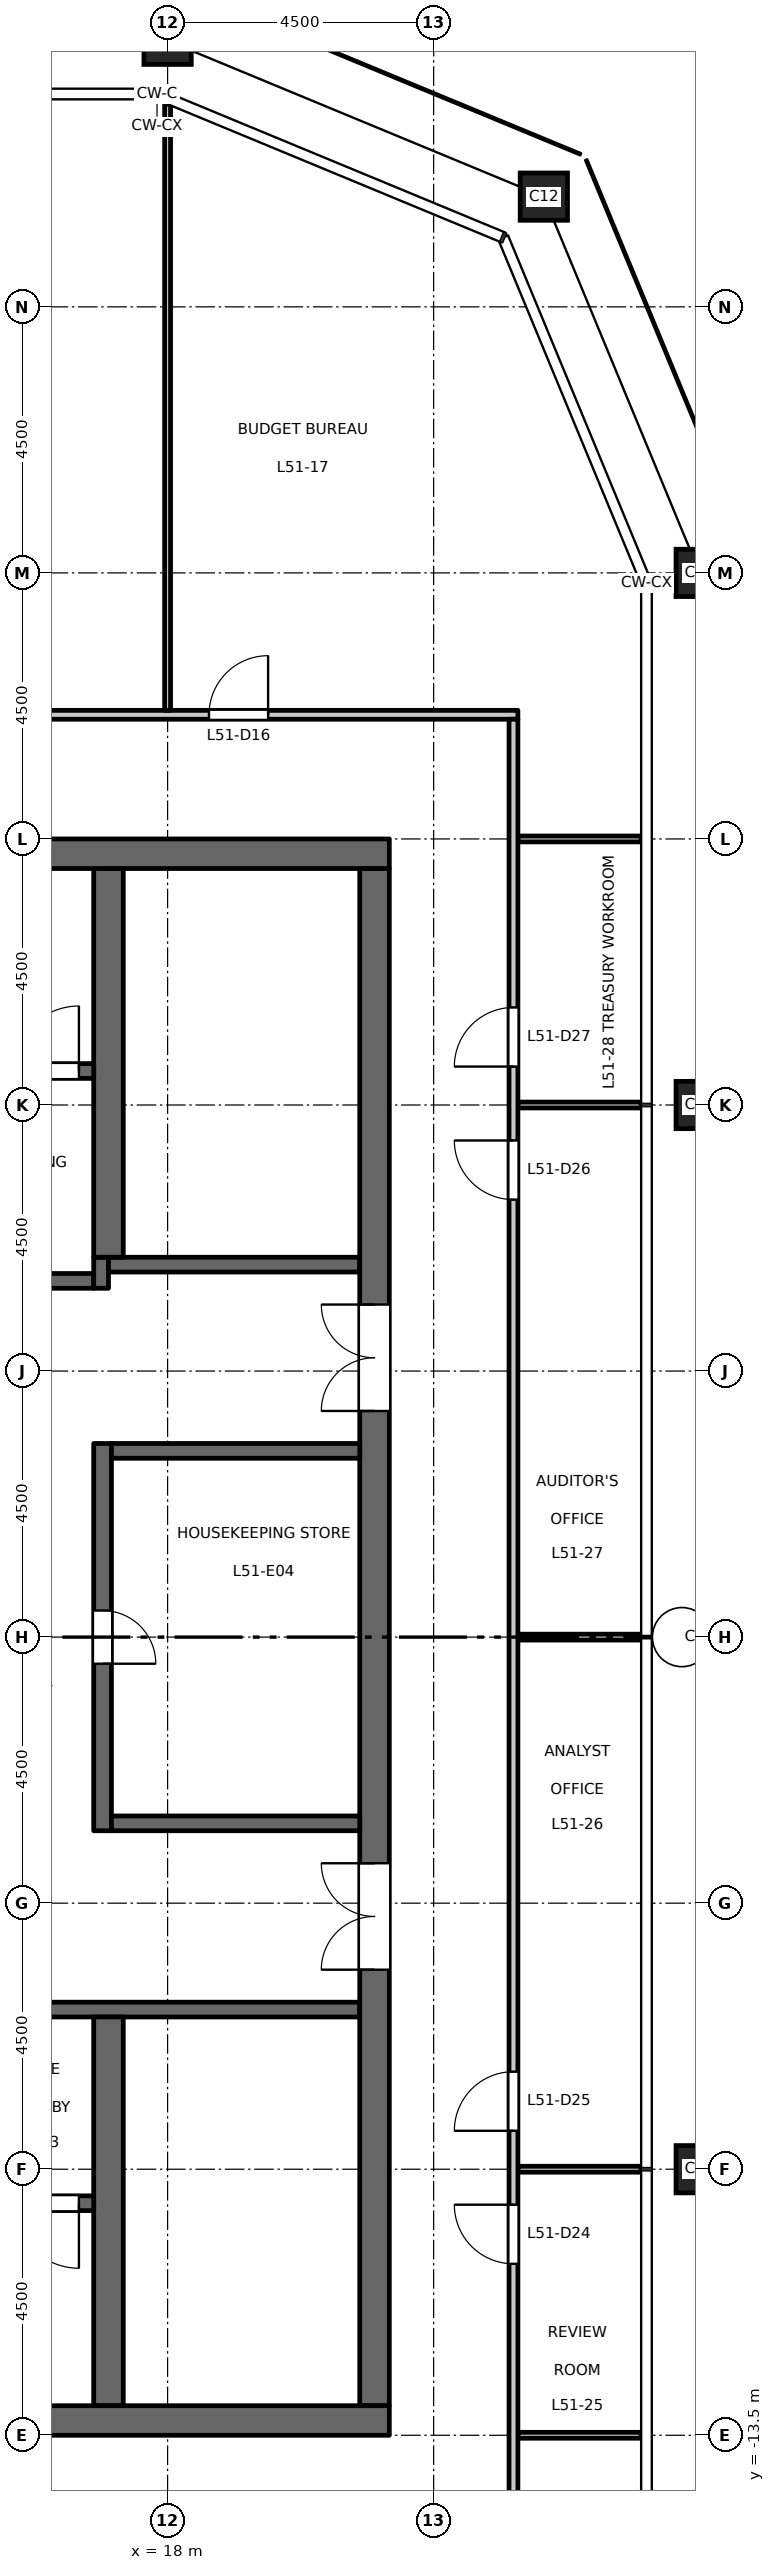
"""IFC4 building model, lengths in metres.
Left out: names, types, materials, properties, quantities, classifications, styles, units other than length and angle.
Written with IfcOpenShell. Run it as: python <this file> out.ifc"""

import sys

from ifc_helpers import new_model, si_unit, direction, frame, frame_2d, origin, origin_2d, place, context, subcontext, project, spatial, rectangle, hollow_rectangle, extrude, element, fill, save


model = new_model("IFC4")
c1 = context("Model", 3, precision=1e-05, world=origin(), true_north=direction((0.0, 1.0)))
c2 = subcontext(c1, "Body", "Model", "MODEL_VIEW")
j1 = project(units=[si_unit("LENGTHUNIT", "METRE"), si_unit("PLANEANGLEUNIT", "RADIAN")], contexts=[c1])
p1 = place(None, origin())
s1 = spatial("IfcSite", under=j1, at=p1, CompositionType="ELEMENT")
p2 = place(p1, origin())
s2 = spatial("IfcBuilding", under=s1, at=p2, CompositionType="ELEMENT")
p3 = place(p2, frame((0.0, 0.0, 237.7)))
s3 = spatial("IfcBuildingStorey", under=s2, at=p3, CompositionType="ELEMENT", Elevation=237.7)
for number, where, z_axis, x_axis in (
    (1, (27.0, -9.0, 0.0), (0.0, 0.0, 1.0), (1.0, 0.0, 0.0)),
    (2, (27.0, 0.0, 0.0), (0.0, 0.0, 1.0), (1.0, 0.0, 0.0)),
    (3, (27.0, 9.0, 0.0), (0.0, 0.0, 1.0), (1.0, 0.0, 0.0)),
    (4, (27.0, 18.0, 0.0), (0.0, 0.0, 1.0), (1.0, 0.0, 0.0)),
    (5, (24.364, 24.364, 0.0), (0.0, 0.0, 1.0), (1.0, 0.0, 0.0)),
    (6, (18.0, 27.0, 0.0), (0.0, 0.0, 1.0), (1.0, 0.0, 0.0)),
):
    element("IfcColumn", number, at=place(p3, frame(where, z_axis=z_axis, x_axis=x_axis)), inside=s3, PredefinedType="COLUMN", context=c2, shape_type="SweptSolid", body=[
        extrude(hollow_rectangle(XDim=0.8, YDim=0.8, WallThickness=0.045, at=origin_2d()), origin(), (0.0, 0.0, 1.0), 4.5),
    ])
p4 = place(p3, frame((12.15, 6.025, 0.0), z_axis=(0.0, 0.0, 1.0), x_axis=(1.0, 0.0, 0.0)))
e7 = element("IfcWall", 7, at=p4, inside=s3, PredefinedType="SHEAR", context=c2, shape_type="SweptSolid", body=[
    extrude(rectangle(XDim=4.6, YDim=0.25, at=frame_2d((2.3, 0.0))), origin(), (0.0, 0.0, 1.0), 4.35),
])
p5 = place(p4, frame((1.8, 0.0, 0.0)))
e8 = element("IfcOpeningElement", 8, at=p5, cuts=e7, PredefinedType="OPENING", context=c2, shape_type="SweptSolid", body=[
    extrude(rectangle(XDim=1.0, YDim=2.1, at=frame_2d((0.5, 1.05))), frame((0.0, 0.135, 0.0), z_axis=(0.0, -1.0, 0.0), x_axis=(1.0, 0.0, 0.0)), (0.0, 0.0, 1.0), 0.27),
])
p6 = place(p3, frame((16.875, 5.9, 0.0), z_axis=(0.0, 0.0, 1.0), x_axis=(0.0, 1.0, 0.0)))
e9 = element("IfcWall", 9, at=p6, inside=s3, PredefinedType="SHEAR", context=c2, shape_type="SweptSolid", body=[
    extrude(rectangle(XDim=0.525, YDim=0.25, at=frame_2d((0.263, 0.0))), origin(), (0.0, 0.0, 1.0), 4.35),
])
p7 = place(p3, frame((17.0, 6.3, 0.0), z_axis=(0.0, 0.0, 1.0), x_axis=(1.0, 0.0, 0.0)))
e10 = element("IfcWall", 10, at=p7, inside=s3, PredefinedType="SHEAR", context=c2, shape_type="SweptSolid", body=[
    extrude(rectangle(XDim=4.25, YDim=0.25, at=frame_2d((2.125, 0.0))), origin(), (0.0, 0.0, 1.0), 4.35),
])
p8 = place(p3, frame((12.15, -6.3, 0.0), z_axis=(0.0, 0.0, 1.0), x_axis=(1.0, 0.0, 0.0)))
e11 = element("IfcWall", 11, at=p8, inside=s3, PredefinedType="SHEAR", context=c2, shape_type="SweptSolid", body=[
    extrude(rectangle(XDim=9.1, YDim=0.25, at=frame_2d((4.55, 0.0))), origin(), (0.0, 0.0, 1.0), 4.35),
])
p9 = place(p8, frame((1.8, 0.0, 0.0)))
e12 = element("IfcOpeningElement", 12, at=p9, cuts=e11, PredefinedType="OPENING", context=c2, shape_type="SweptSolid", body=[
    extrude(rectangle(XDim=1.0, YDim=2.1, at=frame_2d((0.5, 1.05))), frame((0.0, 0.135, 0.0), z_axis=(0.0, -1.0, 0.0), x_axis=(1.0, 0.0, 0.0)), (0.0, 0.0, 1.0), 0.27),
])
p10 = place(p3, frame((21.5, -13.0, 0.0), z_axis=(0.0, 0.0, 1.0), x_axis=(0.0, 1.0, 0.0)))
e13 = element("IfcWall", 13, at=p10, inside=s3, PredefinedType="SHEAR", context=c2, shape_type="SweptSolid", body=[
    extrude(rectangle(XDim=26.0, YDim=0.5, at=frame_2d((13.0, 0.0))), origin(), (0.0, 0.0, 1.0), 4.35),
])
p11 = place(p10, frame((16.825, 0.0, 0.0)))
e14 = element("IfcOpeningElement", 14, at=p11, cuts=e13, PredefinedType="OPENING", context=c2, shape_type="SweptSolid", body=[
    extrude(rectangle(XDim=1.8, YDim=2.1, at=frame_2d((0.9, 1.05))), frame((0.0, 0.26, 0.0), z_axis=(0.0, -1.0, 0.0), x_axis=(1.0, 0.0, 0.0)), (0.0, 0.0, 1.0), 0.52),
])
p12 = place(p10, frame((7.375, 0.0, 0.0)))
e15 = element("IfcOpeningElement", 15, at=p12, cuts=e13, PredefinedType="OPENING", context=c2, shape_type="SweptSolid", body=[
    extrude(rectangle(XDim=1.8, YDim=2.1, at=frame_2d((0.9, 1.05))), frame((0.0, 0.26, 0.0), z_axis=(0.0, -1.0, 0.0), x_axis=(1.0, 0.0, 0.0)), (0.0, 0.0, 1.0), 0.52),
])
p13 = place(p3, frame((16.9, -3.275, 0.0), z_axis=(0.0, 0.0, 1.0), x_axis=(0.0, 1.0, 0.0)))
e16 = element("IfcWall", 16, at=p13, inside=s3, PredefinedType="SHEAR", context=c2, shape_type="SweptSolid", body=[
    extrude(rectangle(XDim=6.55, YDim=0.3, at=frame_2d((3.275, 0.0))), origin(), (0.0, 0.0, 1.0), 4.35),
])
p14 = place(p13, frame((2.825, 0.0, 0.0)))
e17 = element("IfcOpeningElement", 17, at=p14, cuts=e16, PredefinedType="OPENING", context=c2, shape_type="SweptSolid", body=[
    extrude(rectangle(XDim=0.9, YDim=2.1, at=frame_2d((0.45, 1.05))), frame((0.0, 0.16, 0.0), z_axis=(0.0, -1.0, 0.0), x_axis=(1.0, 0.0, 0.0)), (0.0, 0.0, 1.0), 0.32),
])
for number, where, z_axis, x_axis in (
    (18, (17.05, 3.15, 0.0), (0.0, 0.0, 1.0), (1.0, 0.0, 0.0)),
    (19, (17.05, -3.15, 0.0), (0.0, 0.0, 1.0), (1.0, 0.0, 0.0)),
):
    element("IfcWall", number, at=place(p3, frame(where, z_axis=z_axis, x_axis=x_axis)), inside=s3, PredefinedType="SHEAR", context=c2, shape_type="SweptSolid", body=[
        extrude(rectangle(XDim=4.2, YDim=0.25, at=frame_2d((2.1, 0.0))), origin(), (0.0, 0.0, 1.0), 4.35),
    ])
for number, where, z_axis, x_axis in (
    (20, (17.0, 6.425, 0.0), (0.0, 0.0, 1.0), (0.0, 1.0, 0.0)),
    (21, (17.0, -13.0, 0.0), (0.0, 0.0, 1.0), (0.0, 1.0, 0.0)),
):
    element("IfcWall", number, at=place(p3, frame(where, z_axis=z_axis, x_axis=x_axis)), inside=s3, PredefinedType="SHEAR", context=c2, shape_type="SweptSolid", body=[
        extrude(rectangle(XDim=6.575, YDim=0.5, at=frame_2d((3.288, 0.0))), origin(), (0.0, 0.0, 1.0), 4.35),
    ])
p15 = place(p3, frame((8.75, 9.575, 0.0), z_axis=(0.0, 0.0, 1.0), x_axis=(1.0, 0.0, 0.0)))
e22 = element("IfcWall", 22, at=p15, inside=s3, PredefinedType="SHEAR", context=c2, shape_type="SweptSolid", body=[
    extrude(rectangle(XDim=8.0, YDim=0.25, at=frame_2d((4.0, 0.0))), origin(), (0.0, 0.0, 1.0), 4.35),
])
p16 = place(p15, frame((6.65, 0.0, 0.0)))
e23 = element("IfcOpeningElement", 23, at=p16, cuts=e22, PredefinedType="OPENING", context=c2, shape_type="SweptSolid", body=[
    extrude(rectangle(XDim=1.1, YDim=2.1, at=frame_2d((0.55, 1.05))), frame((0.0, 0.135, 0.0), z_axis=(0.0, -1.0, 0.0), x_axis=(1.0, 0.0, 0.0)), (0.0, 0.0, 1.0), 0.27),
])
p17 = place(p3, frame((8.75, -9.575, 0.0), z_axis=(0.0, 0.0, 1.0), x_axis=(1.0, 0.0, 0.0)))
e24 = element("IfcWall", 24, at=p17, inside=s3, PredefinedType="SHEAR", context=c2, shape_type="SweptSolid", body=[
    extrude(rectangle(XDim=8.0, YDim=0.25, at=frame_2d((4.0, 0.0))), origin(), (0.0, 0.0, 1.0), 4.35),
])
p18 = place(p17, frame((6.65, 0.0, 0.0)))
e25 = element("IfcOpeningElement", 25, at=p18, cuts=e24, PredefinedType="OPENING", context=c2, shape_type="SweptSolid", body=[
    extrude(rectangle(XDim=1.1, YDim=2.1, at=frame_2d((0.55, 1.05))), frame((0.0, 0.135, 0.0), z_axis=(0.0, -1.0, 0.0), x_axis=(1.0, 0.0, 0.0)), (0.0, 0.0, 1.0), 0.27),
])
for number, where, z_axis, x_axis in (
    (26, (8.25, 13.25, 0.0), (0.0, 0.0, 1.0), (1.0, 0.0, 0.0)),
    (27, (8.25, -13.25, 0.0), (0.0, 0.0, 1.0), (1.0, 0.0, 0.0)),
):
    element("IfcWall", number, at=place(p3, frame(where, z_axis=z_axis, x_axis=x_axis)), inside=s3, PredefinedType="SHEAR", context=c2, shape_type="SweptSolid", body=[
        extrude(rectangle(XDim=13.5, YDim=0.5, at=frame_2d((6.75, 0.0))), origin(), (0.0, 0.0, 1.0), 4.35),
    ])
p19 = place(p3, frame((23.925, -13.5, 0.0), z_axis=(0.0, 0.0, 1.0), x_axis=(1.0, 0.0, 0.0)))
e28 = element("IfcWall", 28, at=p19, inside=s3, PredefinedType="PARTITIONING", context=c2, shape_type="SweptSolid", body=[
    extrude(rectangle(XDim=2.085, YDim=0.1, at=frame_2d((1.042, 0.0))), origin(), (0.0, 0.0, 1.0), 3.95),
])
for number, where, z_axis, x_axis in (
    (29, (23.925, -9.0, 0.0), (0.0, 0.0, 1.0), (1.0, 0.0, 0.0)),
    (30, (23.925, 0.0, 0.0), (0.0, 0.0, 1.0), (1.0, 0.0, 0.0)),
    (31, (23.925, 9.0, 0.0), (0.0, 0.0, 1.0), (1.0, 0.0, 0.0)),
    (32, (23.925, 13.5, 0.0), (0.0, 0.0, 1.0), (1.0, 0.0, 0.0)),
):
    element("IfcWall", number, at=place(p3, frame(where, z_axis=z_axis, x_axis=x_axis)), inside=s3, PredefinedType="PARTITIONING", context=c2, shape_type="SweptSolid", body=[
        extrude(rectangle(XDim=2.085, YDim=0.1, at=frame_2d((1.042, 0.0))), origin(), (0.0, 0.0, 1.0), 4.35),
    ])
p20 = place(p3, frame((-23.925, 15.6, 0.0), z_axis=(0.0, 0.0, 1.0), x_axis=(1.0, 0.0, 0.0)))
e33 = element("IfcWall", 33, at=p20, inside=s3, PredefinedType="PARTITIONING", context=c2, shape_type="SweptSolid", body=[
    extrude(rectangle(XDim=47.85, YDim=0.15, at=frame_2d((23.925, 0.0))), origin(), (0.0, 0.0, 1.0), 4.35),
])
p21 = place(p20, frame((13.275, 0.0, 0.0)))
e34 = element("IfcOpeningElement", 34, at=p21, cuts=e33, PredefinedType="OPENING", context=c2, shape_type="SweptSolid", body=[
    extrude(rectangle(XDim=1.0, YDim=2.1, at=frame_2d((0.5, 1.05))), frame((0.0, 0.085, 0.0), z_axis=(0.0, -1.0, 0.0), x_axis=(1.0, 0.0, 0.0)), (0.0, 0.0, 1.0), 0.17),
])
p22 = place(p20, frame((15.525, 0.0, 0.0)))
e35 = element("IfcOpeningElement", 35, at=p22, cuts=e33, PredefinedType="OPENING", context=c2, shape_type="SweptSolid", body=[
    extrude(rectangle(XDim=1.0, YDim=2.1, at=frame_2d((0.5, 1.05))), frame((0.0, 0.085, 0.0), z_axis=(0.0, -1.0, 0.0), x_axis=(1.0, 0.0, 0.0)), (0.0, 0.0, 1.0), 0.17),
])
p23 = place(p20, frame((31.275, 0.0, 0.0)))
e36 = element("IfcOpeningElement", 36, at=p23, cuts=e33, PredefinedType="OPENING", context=c2, shape_type="SweptSolid", body=[
    extrude(rectangle(XDim=1.0, YDim=2.1, at=frame_2d((0.5, 1.05))), frame((0.0, 0.085, 0.0), z_axis=(0.0, -1.0, 0.0), x_axis=(1.0, 0.0, 0.0)), (0.0, 0.0, 1.0), 0.17),
])
p24 = place(p20, frame((33.525, 0.0, 0.0)))
e37 = element("IfcOpeningElement", 37, at=p24, cuts=e33, PredefinedType="OPENING", context=c2, shape_type="SweptSolid", body=[
    extrude(rectangle(XDim=1.0, YDim=2.1, at=frame_2d((0.5, 1.05))), frame((0.0, 0.085, 0.0), z_axis=(0.0, -1.0, 0.0), x_axis=(1.0, 0.0, 0.0)), (0.0, 0.0, 1.0), 0.17),
])
p25 = place(p20, frame((4.275, 0.0, 0.0)))
e38 = element("IfcOpeningElement", 38, at=p25, cuts=e33, PredefinedType="OPENING", context=c2, shape_type="SweptSolid", body=[
    extrude(rectangle(XDim=1.0, YDim=2.1, at=frame_2d((0.5, 1.05))), frame((0.0, 0.085, 0.0), z_axis=(0.0, -1.0, 0.0), x_axis=(1.0, 0.0, 0.0)), (0.0, 0.0, 1.0), 0.17),
])
p26 = place(p20, frame((42.625, 0.0, 0.0)))
e39 = element("IfcOpeningElement", 39, at=p26, cuts=e33, PredefinedType="OPENING", context=c2, shape_type="SweptSolid", body=[
    extrude(rectangle(XDim=1.0, YDim=2.1, at=frame_2d((0.5, 1.05))), frame((0.0, 0.085, 0.0), z_axis=(0.0, -1.0, 0.0), x_axis=(1.0, 0.0, 0.0)), (0.0, 0.0, 1.0), 0.17),
])
p27 = place(p3, frame((18.0, 15.675, 0.0), z_axis=(0.0, 0.0, 1.0), x_axis=(0.0, 1.0, 0.0)))
e40 = element("IfcWall", 40, at=p27, inside=s3, PredefinedType="PARTITIONING", context=c2, shape_type="SweptSolid", body=[
    extrude(rectangle(XDim=10.253, YDim=0.1, at=frame_2d((5.126, 0.0))), origin(), (0.0, 0.0, 1.0), 3.65),
])
p28 = place(p3, frame((23.85, -15.525, 0.0), z_axis=(0.0, 0.0, 1.0), x_axis=(0.0, 1.0, 0.0)))
e41 = element("IfcWall", 41, at=p28, inside=s3, PredefinedType="PARTITIONING", context=c2, shape_type="SweptSolid", body=[
    extrude(rectangle(XDim=31.05, YDim=0.15, at=frame_2d((15.525, 0.0))), origin(), (0.0, 0.0, 1.0), 4.35),
])
p29 = place(p28, frame((4.925, 0.0, 0.0)))
e42 = element("IfcOpeningElement", 42, at=p29, cuts=e41, PredefinedType="OPENING", context=c2, shape_type="SweptSolid", body=[
    extrude(rectangle(XDim=1.0, YDim=2.1, at=frame_2d((0.5, 1.05))), frame((0.0, 0.085, 0.0), z_axis=(0.0, -1.0, 0.0), x_axis=(1.0, 0.0, 0.0)), (0.0, 0.0, 1.0), 0.17),
])
p30 = place(p28, frame((7.175, 0.0, 0.0)))
e43 = element("IfcOpeningElement", 43, at=p30, cuts=e41, PredefinedType="OPENING", context=c2, shape_type="SweptSolid", body=[
    extrude(rectangle(XDim=1.0, YDim=2.1, at=frame_2d((0.5, 1.05))), frame((0.0, 0.085, 0.0), z_axis=(0.0, -1.0, 0.0), x_axis=(1.0, 0.0, 0.0)), (0.0, 0.0, 1.0), 0.17),
])
p31 = place(p28, frame((22.925, 0.0, 0.0)))
e44 = element("IfcOpeningElement", 44, at=p31, cuts=e41, PredefinedType="OPENING", context=c2, shape_type="SweptSolid", body=[
    extrude(rectangle(XDim=1.0, YDim=2.1, at=frame_2d((0.5, 1.05))), frame((0.0, 0.085, 0.0), z_axis=(0.0, -1.0, 0.0), x_axis=(1.0, 0.0, 0.0)), (0.0, 0.0, 1.0), 0.17),
])
p32 = place(p28, frame((25.175, 0.0, 0.0)))
e45 = element("IfcOpeningElement", 45, at=p32, cuts=e41, PredefinedType="OPENING", context=c2, shape_type="SweptSolid", body=[
    extrude(rectangle(XDim=1.0, YDim=2.1, at=frame_2d((0.5, 1.05))), frame((0.0, 0.085, 0.0), z_axis=(0.0, -1.0, 0.0), x_axis=(1.0, 0.0, 0.0)), (0.0, 0.0, 1.0), 0.17),
])
p33 = place(p16, origin())
e46 = element("IfcDoor", 46, at=p33, inside=s3, OperationType="SINGLE_SWING_LEFT", PredefinedType="DOOR", context=c2, shape_type="SweptSolid", body=[
    extrude(rectangle(XDim=1.1, YDim=2.1, at=frame_2d((0.55, 1.05))), frame((0.0, 0.025, 0.0), z_axis=(0.0, -1.0, 0.0), x_axis=(1.0, 0.0, 0.0)), (0.0, 0.0, 1.0), 0.05),
])
fill(e23, e46)
p34 = place(p18, origin())
e47 = element("IfcDoor", 47, at=p34, inside=s3, OperationType="SINGLE_SWING_RIGHT", PredefinedType="DOOR", context=c2, shape_type="SweptSolid", body=[
    extrude(rectangle(XDim=1.1, YDim=2.1, at=frame_2d((0.55, 1.05))), frame((0.0, 0.025, 0.0), z_axis=(0.0, -1.0, 0.0), x_axis=(1.0, 0.0, 0.0)), (0.0, 0.0, 1.0), 0.05),
])
fill(e25, e47)
p35 = place(p11, origin())
e48 = element("IfcDoor", 48, at=p35, inside=s3, OperationType="DOUBLE_DOOR_DOUBLE_SWING", PredefinedType="DOOR", context=c2, shape_type="SweptSolid", body=[
    extrude(rectangle(XDim=1.8, YDim=2.1, at=frame_2d((0.9, 1.05))), frame((0.0, 0.025, 0.0), z_axis=(0.0, -1.0, 0.0), x_axis=(1.0, 0.0, 0.0)), (0.0, 0.0, 1.0), 0.05),
])
fill(e14, e48)
p36 = place(p12, origin())
e49 = element("IfcDoor", 49, at=p36, inside=s3, OperationType="DOUBLE_DOOR_DOUBLE_SWING", PredefinedType="DOOR", context=c2, shape_type="SweptSolid", body=[
    extrude(rectangle(XDim=1.8, YDim=2.1, at=frame_2d((0.9, 1.05))), frame((0.0, 0.025, 0.0), z_axis=(0.0, -1.0, 0.0), x_axis=(1.0, 0.0, 0.0)), (0.0, 0.0, 1.0), 0.05),
])
fill(e15, e49)
p37 = place(p14, origin())
e50 = element("IfcDoor", 50, at=p37, inside=s3, OperationType="SINGLE_SWING_LEFT", PredefinedType="DOOR", context=c2, shape_type="SweptSolid", body=[
    extrude(rectangle(XDim=0.9, YDim=2.1, at=frame_2d((0.45, 1.05))), frame((0.0, 0.025, 0.0), z_axis=(0.0, -1.0, 0.0), x_axis=(1.0, 0.0, 0.0)), (0.0, 0.0, 1.0), 0.05),
])
fill(e17, e50)
p38 = place(p26, origin())
e51 = element("IfcDoor", 51, at=p38, inside=s3, OperationType="SINGLE_SWING_RIGHT", PredefinedType="DOOR", context=c2, shape_type="SweptSolid", body=[
    extrude(rectangle(XDim=1.0, YDim=2.1, at=frame_2d((0.5, 1.05))), frame((0.0, 0.025, 0.0), z_axis=(0.0, -1.0, 0.0), x_axis=(1.0, 0.0, 0.0)), (0.0, 0.0, 1.0), 0.05),
])
fill(e39, e51)
p39 = place(p29, origin())
e52 = element("IfcDoor", 52, at=p39, inside=s3, OperationType="SINGLE_SWING_RIGHT", PredefinedType="DOOR", context=c2, shape_type="SweptSolid", body=[
    extrude(rectangle(XDim=1.0, YDim=2.1, at=frame_2d((0.5, 1.05))), frame((0.0, 0.025, 0.0), z_axis=(0.0, -1.0, 0.0), x_axis=(1.0, 0.0, 0.0)), (0.0, 0.0, 1.0), 0.05),
])
fill(e42, e52)
p40 = place(p30, origin())
e53 = element("IfcDoor", 53, at=p40, inside=s3, OperationType="SINGLE_SWING_LEFT", PredefinedType="DOOR", context=c2, shape_type="SweptSolid", body=[
    extrude(rectangle(XDim=1.0, YDim=2.1, at=frame_2d((0.5, 1.05))), frame((0.0, 0.025, 0.0), z_axis=(0.0, -1.0, 0.0), x_axis=(1.0, 0.0, 0.0)), (0.0, 0.0, 1.0), 0.05),
])
fill(e43, e53)
p41 = place(p31, origin())
e54 = element("IfcDoor", 54, at=p41, inside=s3, OperationType="SINGLE_SWING_RIGHT", PredefinedType="DOOR", context=c2, shape_type="SweptSolid", body=[
    extrude(rectangle(XDim=1.0, YDim=2.1, at=frame_2d((0.5, 1.05))), frame((0.0, 0.025, 0.0), z_axis=(0.0, -1.0, 0.0), x_axis=(1.0, 0.0, 0.0)), (0.0, 0.0, 1.0), 0.05),
])
fill(e44, e54)
p42 = place(p32, origin())
e55 = element("IfcDoor", 55, at=p42, inside=s3, OperationType="SINGLE_SWING_LEFT", PredefinedType="DOOR", context=c2, shape_type="SweptSolid", body=[
    extrude(rectangle(XDim=1.0, YDim=2.1, at=frame_2d((0.5, 1.05))), frame((0.0, 0.025, 0.0), z_axis=(0.0, -1.0, 0.0), x_axis=(1.0, 0.0, 0.0)), (0.0, 0.0, 1.0), 0.05),
])
fill(e45, e55)
save(model, sys.argv[1])
